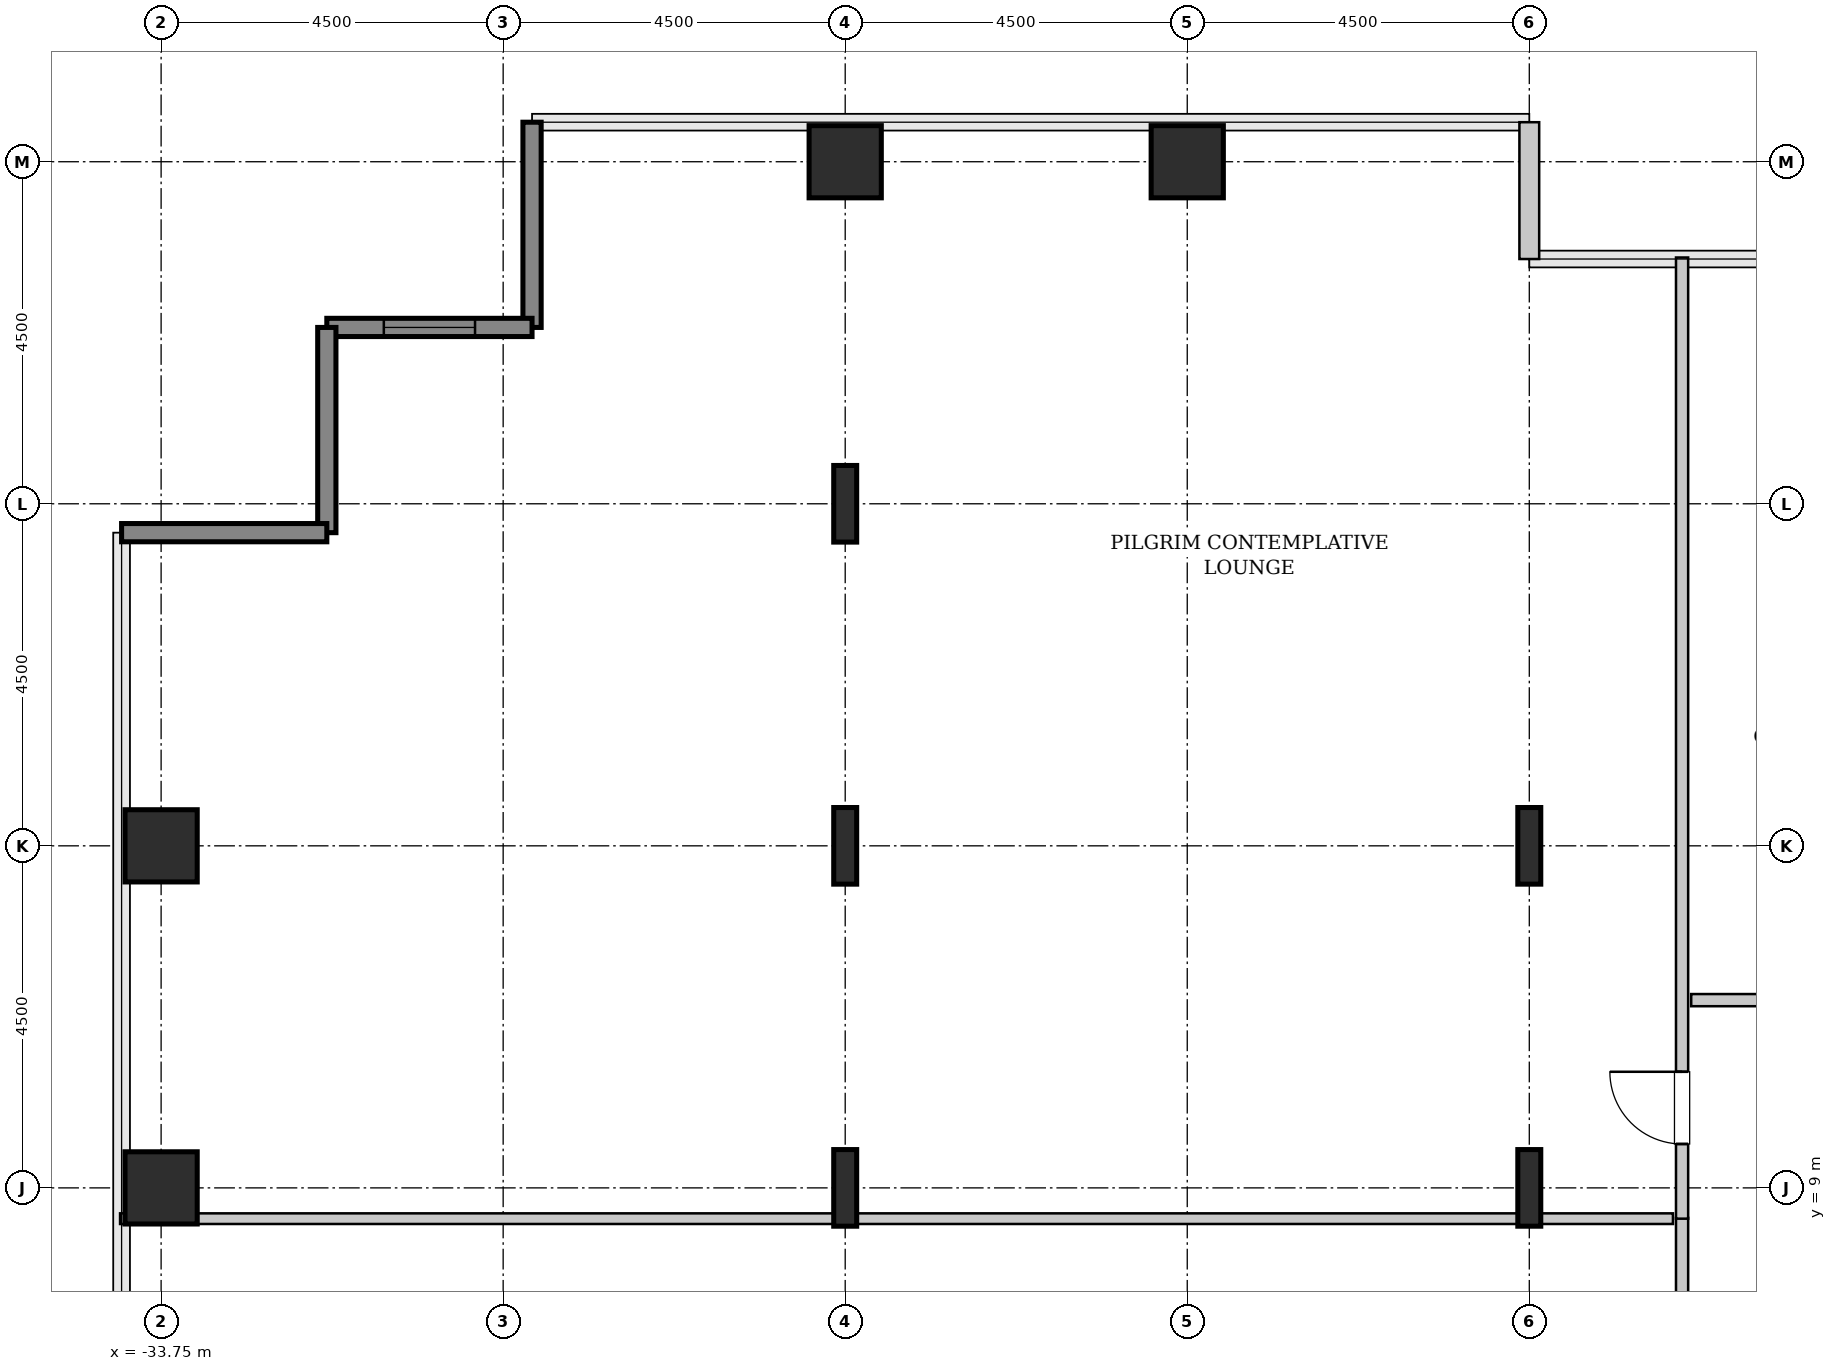
"""IFC4 building model, lengths in metres.
Left out: names, types, materials, properties, quantities, classifications, styles, units other than length and angle.
Written with IfcOpenShell. Run it as: python <this file> out.ifc"""

import sys

from ifc_helpers import new_model, si_unit, direction, frame, frame_2d, origin, origin_2d, place, context, subcontext, project, spatial, rectangle, hollow_rectangle, i_section, extrude, source, transform, mapped, element, fill, save


model = new_model("IFC4")
c1 = context("Model", 3, precision=1e-05, world=origin(), true_north=direction((0.0, 1.0)))
c2 = subcontext(c1, "Body", "Model", "MODEL_VIEW")
j1 = project(units=[si_unit("LENGTHUNIT", "METRE"), si_unit("PLANEANGLEUNIT", "RADIAN")], contexts=[c1])
p1 = place(None, origin())
s1 = spatial("IfcSite", under=j1, at=p1, CompositionType="ELEMENT")
p2 = place(p1, origin())
s2 = spatial("IfcBuilding", under=s1, at=p2, CompositionType="ELEMENT")
p3 = place(p2, frame((0.0, 0.0, 74.8)))
s3 = spatial("IfcBuildingStorey", under=s2, at=p3, CompositionType="ELEMENT", Elevation=74.8)
m1 = source(origin(), c2, "Body", "SweptSolid", [
    extrude(hollow_rectangle(XDim=0.95, YDim=0.95, WallThickness=0.045, InnerFilletRadius=0.045, OuterFilletRadius=0.09, at=origin_2d()), origin(), (0.0, 0.0, 1.0), 3.8),
])
for number, where, z_axis, x_axis in (
    (1, (-33.75, 9.0, 0.0), (0.0, 0.0, 1.0), (1.0, 0.0, 0.0)),
    (2, (-33.75, 13.5, 0.0), (0.0, 0.0, 1.0), (1.0, 0.0, 0.0)),
):
    element("IfcColumn", number, at=place(p3, frame(where, z_axis=z_axis, x_axis=x_axis)), inside=s3, PredefinedType="COLUMN", context=c2, shape_type="MappedRepresentation", body=[
        mapped(m1, transform((0.0, 0.0, 0.0), x_axis=(1.0, 0.0, 0.0), y_axis=(0.0, 1.0, 0.0), z_axis=(0.0, 0.0, 1.0), scale=1.0)),
    ])
m2 = source(origin(), c2, "Body", "SweptSolid", [
    extrude(i_section(OverallWidth=0.302, OverallDepth=1.008, WebThickness=0.021, FlangeThickness=0.04, FilletRadius=0.03, at=origin_2d()), origin(), (0.0, 0.0, 1.0), 3.8),
])
for number, where, z_axis, x_axis in (
    (3, (-24.75, 9.0, 0.0), (0.0, 0.0, 1.0), (1.0, 0.0, 0.0)),
    (4, (-24.75, 13.5, 0.0), (0.0, 0.0, 1.0), (1.0, 0.0, 0.0)),
    (5, (-24.75, 18.0, 0.0), (0.0, 0.0, 1.0), (1.0, 0.0, 0.0)),
):
    element("IfcColumn", number, at=place(p3, frame(where, z_axis=z_axis, x_axis=x_axis)), inside=s3, PredefinedType="COLUMN", context=c2, shape_type="MappedRepresentation", body=[
        mapped(m2, transform((0.0, 0.0, 0.0), x_axis=(1.0, 0.0, 0.0), y_axis=(0.0, 1.0, 0.0), z_axis=(0.0, 0.0, 1.0), scale=1.0)),
    ])
for number, where, z_axis, x_axis in (
    (6, (-24.75, 22.5, 0.0), (0.0, 0.0, 1.0), (1.0, 0.0, 0.0)),
    (7, (-20.25, 22.5, 0.0), (0.0, 0.0, 1.0), (1.0, 0.0, 0.0)),
):
    element("IfcColumn", number, at=place(p3, frame(where, z_axis=z_axis, x_axis=x_axis)), inside=s3, PredefinedType="COLUMN", context=c2, shape_type="MappedRepresentation", body=[
        mapped(m1, transform((0.0, 0.0, 0.0), x_axis=(1.0, 0.0, 0.0), y_axis=(0.0, 1.0, 0.0), z_axis=(0.0, 0.0, 1.0), scale=1.0)),
    ])
for number, where, z_axis, x_axis in (
    (8, (-15.75, 9.0, 0.0), (0.0, 0.0, 1.0), (1.0, 0.0, 0.0)),
    (9, (-15.75, 13.5, 0.0), (0.0, 0.0, 1.0), (1.0, 0.0, 0.0)),
):
    element("IfcColumn", number, at=place(p3, frame(where, z_axis=z_axis, x_axis=x_axis)), inside=s3, PredefinedType="COLUMN", context=c2, shape_type="MappedRepresentation", body=[
        mapped(m2, transform((0.0, 0.0, 0.0), x_axis=(1.0, 0.0, 0.0), y_axis=(0.0, 1.0, 0.0), z_axis=(0.0, 0.0, 1.0), scale=1.0)),
    ])
m3 = source(origin(), c2, "Body", "SweptSolid", [
    extrude(rectangle(XDim=1.8, YDim=0.26, at=frame_2d((0.9, 0.0))), origin(), (0.0, 0.0, 1.0), 3.55),
])
p4 = place(p3, frame((-15.75, 21.22, 0.0), z_axis=(0.0, 0.0, 1.0), x_axis=(0.0, 1.0, 0.0)))
e10 = element("IfcWall", 10, at=p4, inside=s3, PredefinedType="SOLIDWALL", context=c2, shape_type="MappedRepresentation", body=[
    mapped(m3, transform((0.0, 0.0, 0.0), x_axis=(1.0, 0.0, 0.0), y_axis=(0.0, 1.0, 0.0), z_axis=(0.0, 0.0, 1.0), scale=1.0)),
])
m4 = source(origin(), c2, "Body", "SweptSolid", [
    extrude(rectangle(XDim=2.7, YDim=0.24, at=frame_2d((1.35, 0.0))), origin(), (0.0, 0.0, 1.0), 3.55),
])
p5 = place(p3, frame((-28.87, 23.02, 0.0), z_axis=(0.0, 0.0, 1.0), x_axis=(0.0, -1.0, 0.0)))
e11 = element("IfcWall", 11, at=p5, inside=s3, PredefinedType="SHEAR", context=c2, shape_type="MappedRepresentation", body=[
    mapped(m4, transform((0.0, 0.0, 0.0), x_axis=(1.0, 0.0, 0.0), y_axis=(0.0, 1.0, 0.0), z_axis=(0.0, 0.0, 1.0), scale=1.0)),
])
p6 = place(p3, frame((-28.87, 20.32, 0.0), z_axis=(0.0, 0.0, 1.0), x_axis=(-1.0, 0.0, 0.0)))
e12 = element("IfcWall", 12, at=p6, inside=s3, PredefinedType="SHEAR", context=c2, shape_type="MappedRepresentation", body=[
    mapped(m4, transform((0.0, 0.0, 0.0), x_axis=(1.0, 0.0, 0.0), y_axis=(0.0, 1.0, 0.0), z_axis=(0.0, 0.0, 1.0), scale=1.0)),
])
p7 = place(p6, frame((0.75, 0.0, 0.85)))
e13 = element("IfcOpeningElement", 13, at=p7, cuts=e12, PredefinedType="OPENING", context=c2, shape_type="SweptSolid", body=[
    extrude(rectangle(XDim=1.2, YDim=1.8, at=frame_2d((0.6, 0.9))), frame((0.0, 0.13, 0.0), z_axis=(0.0, -1.0, 0.0), x_axis=(1.0, 0.0, 0.0)), (0.0, 0.0, 1.0), 0.26),
])
for number, where, z_axis, x_axis in (
    (14, (-31.57, 20.32, 0.0), (0.0, 0.0, 1.0), (0.0, -1.0, 0.0)),
    (15, (-31.57, 17.62, 0.0), (0.0, 0.0, 1.0), (-1.0, 0.0, 0.0)),
):
    element("IfcWall", number, at=place(p3, frame(where, z_axis=z_axis, x_axis=x_axis)), inside=s3, PredefinedType="SHEAR", context=c2, shape_type="MappedRepresentation", body=[
        mapped(m4, transform((0.0, 0.0, 0.0), x_axis=(1.0, 0.0, 0.0), y_axis=(0.0, 1.0, 0.0), z_axis=(0.0, 0.0, 1.0), scale=1.0)),
    ])
m5 = source(origin(), c2, "Body", "SweptSolid", [
    extrude(rectangle(XDim=3.21, YDim=0.16, at=frame_2d((1.605, 0.0))), origin(), (0.0, 0.0, 1.0), 3.535),
])
p8 = place(p3, frame((-13.74, 5.395, 0.0), z_axis=(0.0, 0.0, 1.0), x_axis=(0.0, 1.0, 0.0)))
e16 = element("IfcWall", 16, at=p8, inside=s3, PredefinedType="PARTITIONING", context=c2, shape_type="MappedRepresentation", body=[
    mapped(m5, transform((0.0, 0.0, 0.0), x_axis=(1.0, 0.0, 0.0), y_axis=(0.0, 1.0, 0.0), z_axis=(0.0, 0.0, 1.0), scale=1.0)),
])
p9 = place(p8, frame((1.13, 0.0, 0.0)))
e17 = element("IfcOpeningElement", 17, at=p9, cuts=e16, PredefinedType="OPENING", context=c2, shape_type="SweptSolid", body=[
    extrude(rectangle(XDim=0.95, YDim=2.1, at=frame_2d((0.475, 1.05))), frame((0.0, 0.09, 0.0), z_axis=(0.0, -1.0, 0.0), x_axis=(1.0, 0.0, 0.0)), (0.0, 0.0, 1.0), 0.18),
])
m6 = source(origin(), c2, "Body", "SweptSolid", [
    extrude(rectangle(XDim=20.43, YDim=0.14, at=frame_2d((10.215, 0.0))), origin(), (0.0, 0.0, 1.0), 2.825),
])
p10 = place(p3, frame((-34.29, 8.595, 0.0), z_axis=(0.0, 0.0, 1.0), x_axis=(1.0, 0.0, 0.0)))
e18 = element("IfcWall", 18, at=p10, inside=s3, PredefinedType="PARTITIONING", context=c2, shape_type="MappedRepresentation", body=[
    mapped(m6, transform((0.0, 0.0, 0.0), x_axis=(1.0, 0.0, 0.0), y_axis=(0.0, 1.0, 0.0), z_axis=(0.0, 0.0, 1.0), scale=1.0)),
])
m7 = source(origin(), c2, "Body", "SweptSolid", [
    extrude(rectangle(XDim=12.645, YDim=0.16, at=frame_2d((6.323, 0.0))), origin(), (0.0, 0.0, 1.0), 3.535),
])
p11 = place(p3, frame((-13.74, 8.595, 0.0), z_axis=(0.0, 0.0, 1.0), x_axis=(0.0, 1.0, 0.0)))
e19 = element("IfcWall", 19, at=p11, inside=s3, PredefinedType="PARTITIONING", context=c2, shape_type="MappedRepresentation", body=[
    mapped(m7, transform((0.0, 0.0, 0.0), x_axis=(1.0, 0.0, 0.0), y_axis=(0.0, 1.0, 0.0), z_axis=(0.0, 0.0, 1.0), scale=1.0)),
])
p12 = place(p11, frame((0.982, 0.0, 0.0)))
e20 = element("IfcOpeningElement", 20, at=p12, cuts=e19, PredefinedType="OPENING", context=c2, shape_type="SweptSolid", body=[
    extrude(rectangle(XDim=0.95, YDim=2.1, at=frame_2d((0.475, 1.05))), frame((0.0, 0.09, 0.0), z_axis=(0.0, -1.0, 0.0), x_axis=(1.0, 0.0, 0.0)), (0.0, 0.0, 1.0), 0.18),
])
m8 = source(origin(), c2, "Body", "SweptSolid", [
    extrude(rectangle(XDim=4.125, YDim=0.16, at=frame_2d((2.062, 0.0))), origin(), (0.0, 0.0, 1.0), 3.535),
])
p13 = place(p3, frame((-13.62, 11.47, 0.0), z_axis=(0.0, 0.0, 1.0), x_axis=(1.0, 0.0, 0.0)))
e21 = element("IfcWall", 21, at=p13, inside=s3, PredefinedType="PARTITIONING", context=c2, shape_type="MappedRepresentation", body=[
    mapped(m8, transform((0.0, 0.0, 0.0), x_axis=(1.0, 0.0, 0.0), y_axis=(0.0, 1.0, 0.0), z_axis=(0.0, 0.0, 1.0), scale=1.0)),
])
p14 = place(p13, frame((1.587, 0.0, 0.0)))
e22 = element("IfcOpeningElement", 22, at=p14, cuts=e21, PredefinedType="OPENING", context=c2, shape_type="SweptSolid", body=[
    extrude(rectangle(XDim=0.95, YDim=2.1, at=frame_2d((0.475, 1.05))), frame((0.0, 0.09, 0.0), z_axis=(0.0, -1.0, 0.0), x_axis=(1.0, 0.0, 0.0)), (0.0, 0.0, 1.0), 0.18),
])
m9 = source(origin(), c2, "Body", "SweptSolid", [
    extrude(rectangle(XDim=1.2, YDim=1.8, at=frame_2d((0.6, 0.9))), frame((0.0, 0.03, 0.0), z_axis=(0.0, -1.0, 0.0), x_axis=(1.0, 0.0, 0.0)), (0.0, 0.0, 1.0), 0.06),
])
p15 = place(p7, origin())
e23 = element("IfcWindow", 23, at=p15, inside=s3, PartitioningType="SINGLE_PANEL", PredefinedType="WINDOW", context=c2, shape_type="MappedRepresentation", body=[
    mapped(m9, transform((0.0, 0.0, 0.0), x_axis=(1.0, 0.0, 0.0), y_axis=(0.0, 1.0, 0.0), z_axis=(0.0, 0.0, 1.0), scale=1.0)),
])
fill(e13, e23)
m10 = source(origin(), c2, "Body", "SweptSolid", [
    extrude(rectangle(XDim=0.95, YDim=2.1, at=frame_2d((0.475, 1.05))), frame((0.0, 0.025, 0.0), z_axis=(0.0, -1.0, 0.0), x_axis=(1.0, 0.0, 0.0)), (0.0, 0.0, 1.0), 0.05),
])
p16 = place(p12, origin())
e24 = element("IfcDoor", 24, at=p16, inside=s3, OperationType="SINGLE_SWING_RIGHT", PredefinedType="DOOR", context=c2, shape_type="MappedRepresentation", body=[
    mapped(m10, transform((0.0, 0.0, 0.0), x_axis=(1.0, 0.0, 0.0), y_axis=(0.0, 1.0, 0.0), z_axis=(0.0, 0.0, 1.0), scale=1.0)),
])
fill(e20, e24)
save(model, sys.argv[1])
